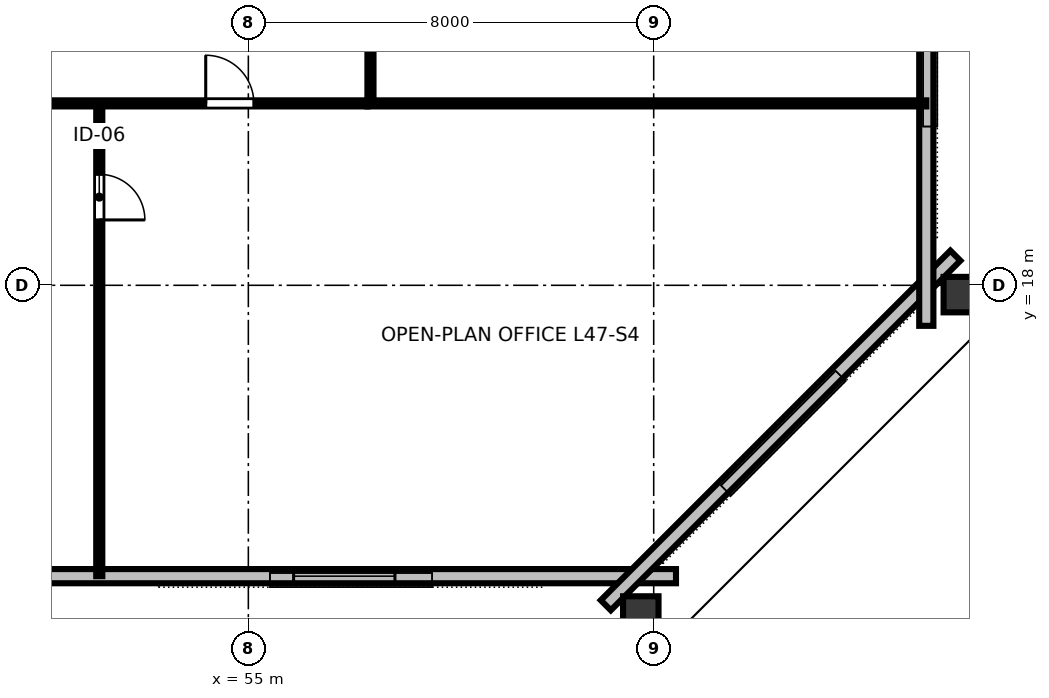
"""IFC4 building model, lengths in metres.
Left out: names, types, materials, properties, quantities, classifications, styles, units other than length and angle.
Written with IfcOpenShell. Run it as: python <this file> out.ifc"""

import sys

from ifc_helpers import new_model, si_unit, direction, frame, frame_2d, origin, origin_2d, place, context, subcontext, project, spatial, rectangle, hollow_rectangle, extrude, element, fill, save


model = new_model("IFC4")
c1 = context("Model", 3, precision=1e-05, world=origin(), true_north=direction((0.0, 1.0)))
c2 = subcontext(c1, "Body", "Model", "MODEL_VIEW")
j1 = project(units=[si_unit("LENGTHUNIT", "METRE"), si_unit("PLANEANGLEUNIT", "RADIAN")], contexts=[c1])
p1 = place(None, origin())
s1 = spatial("IfcSite", under=j1, at=p1, CompositionType="ELEMENT")
p2 = place(p1, origin())
s2 = spatial("IfcBuilding", under=s1, at=p2, CompositionType="ELEMENT")
p3 = place(p2, frame((0.0, 0.0, 180.6)))
s3 = spatial("IfcBuildingStorey", under=s2, at=p3, CompositionType="ELEMENT", Elevation=180.6)
for number, where, z_axis, x_axis in (
    (1, (62.745, 11.438, 0.0), (0.0, 0.0, 1.0), (1.0, 0.0, 0.0)),
    (2, (69.146, 17.816, 0.0), (0.0, 0.0, 1.0), (0.0, 1.0, 0.0)),
):
    element("IfcColumn", number, at=place(p3, frame(where, z_axis=z_axis, x_axis=x_axis)), inside=s3, PredefinedType="COLUMN", context=c2, shape_type="SweptSolid", body=[
        extrude(hollow_rectangle(XDim=0.7, YDim=0.85, WallThickness=0.04, at=origin_2d()), origin(), (0.0, 0.0, 1.0), 3.358),
    ])
p4 = place(p3, frame((28.56, 12.26, 0.0), z_axis=(0.0, 0.0, 1.0), x_axis=(1.0, 0.0, 0.0)))
e3 = element("IfcWall", 3, at=p4, inside=s3, PredefinedType="STANDARD", context=c2, shape_type="SweptSolid", body=[
    extrude(rectangle(XDim=34.88, YDim=0.28, at=frame_2d((17.44, 0.0))), origin(), (0.0, 0.0, 1.0), 3.36),
])
p5 = place(p4, frame((5.547, 0.0, 0.8)))
e4 = element("IfcOpeningElement", 4, at=p5, cuts=e3, PredefinedType="OPENING", context=c2, shape_type="SweptSolid", body=[
    extrude(rectangle(XDim=2.0, YDim=1.95, at=frame_2d((1.0, 0.975))), frame((0.0, 0.15, 0.0), z_axis=(0.0, -1.0, 0.0), x_axis=(1.0, 0.0, 0.0)), (0.0, 0.0, 1.0), 0.3),
])
p6 = place(p4, frame((9.178, 0.0, 0.8)))
e5 = element("IfcOpeningElement", 5, at=p6, cuts=e3, PredefinedType="OPENING", context=c2, shape_type="SweptSolid", body=[
    extrude(rectangle(XDim=2.0, YDim=1.95, at=frame_2d((1.0, 0.975))), frame((0.0, 0.15, 0.0), z_axis=(0.0, -1.0, 0.0), x_axis=(1.0, 0.0, 0.0)), (0.0, 0.0, 1.0), 0.3),
])
p7 = place(p4, frame((20.071, 0.0, 0.8)))
e6 = element("IfcOpeningElement", 6, at=p7, cuts=e3, PredefinedType="OPENING", context=c2, shape_type="SweptSolid", body=[
    extrude(rectangle(XDim=2.0, YDim=1.95, at=frame_2d((1.0, 0.975))), frame((0.0, 0.15, 0.0), z_axis=(0.0, -1.0, 0.0), x_axis=(1.0, 0.0, 0.0)), (0.0, 0.0, 1.0), 0.3),
])
p8 = place(p4, frame((27.333, 0.0, 0.8)))
e7 = element("IfcOpeningElement", 7, at=p8, cuts=e3, PredefinedType="OPENING", context=c2, shape_type="SweptSolid", body=[
    extrude(rectangle(XDim=2.0, YDim=1.95, at=frame_2d((1.0, 0.975))), frame((0.0, 0.15, 0.0), z_axis=(0.0, -1.0, 0.0), x_axis=(1.0, 0.0, 0.0)), (0.0, 0.0, 1.0), 0.3),
])
p9 = place(p3, frame((62.054, 11.686, 0.0), z_axis=(0.0, 0.0, 1.0), x_axis=(0.707106781187, 0.707106781187, 0.0)))
e8 = element("IfcWall", 8, at=p9, inside=s3, PredefinedType="STANDARD", context=c2, shape_type="SweptSolid", body=[
    extrude(rectangle(XDim=9.757, YDim=0.28, at=frame_2d((4.879, 0.0))), origin(), (0.0, 0.0, 1.0), 3.36),
])
p10 = place(p3, frame((68.38, 17.2, 0.0), z_axis=(0.0, 0.0, 1.0), x_axis=(0.0, 1.0, 0.0)))
e9 = element("IfcWall", 9, at=p10, inside=s3, PredefinedType="STANDARD", context=c2, shape_type="SweptSolid", body=[
    extrude(rectangle(XDim=29.6, YDim=0.28, at=frame_2d((14.8, 0.0))), origin(), (0.0, 0.0, 1.0), 3.36),
])
p11 = place(p10, frame((5.971, 0.0, 0.8)))
e10 = element("IfcOpeningElement", 10, at=p11, cuts=e9, PredefinedType="OPENING", context=c2, shape_type="SweptSolid", body=[
    extrude(rectangle(XDim=2.0, YDim=1.95, at=frame_2d((1.0, 0.975))), frame((0.0, 0.15, 0.0), z_axis=(0.0, -1.0, 0.0), x_axis=(1.0, 0.0, 0.0)), (0.0, 0.0, 1.0), 0.3),
])
p12 = place(p10, frame((9.886, 0.0, 0.8)))
e11 = element("IfcOpeningElement", 11, at=p12, cuts=e9, PredefinedType="OPENING", context=c2, shape_type="SweptSolid", body=[
    extrude(rectangle(XDim=2.0, YDim=1.95, at=frame_2d((1.0, 0.975))), frame((0.0, 0.15, 0.0), z_axis=(0.0, -1.0, 0.0), x_axis=(1.0, 0.0, 0.0)), (0.0, 0.0, 1.0), 0.3),
])
p13 = place(p10, frame((17.714, 0.0, 0.8)))
e12 = element("IfcOpeningElement", 12, at=p13, cuts=e9, PredefinedType="OPENING", context=c2, shape_type="SweptSolid", body=[
    extrude(rectangle(XDim=2.0, YDim=1.95, at=frame_2d((1.0, 0.975))), frame((0.0, 0.15, 0.0), z_axis=(0.0, -1.0, 0.0), x_axis=(1.0, 0.0, 0.0)), (0.0, 0.0, 1.0), 0.3),
])
p14 = place(p10, frame((21.629, 0.0, 0.8)))
e13 = element("IfcOpeningElement", 13, at=p14, cuts=e9, PredefinedType="OPENING", context=c2, shape_type="SweptSolid", body=[
    extrude(rectangle(XDim=2.0, YDim=1.95, at=frame_2d((1.0, 0.975))), frame((0.0, 0.15, 0.0), z_axis=(0.0, -1.0, 0.0), x_axis=(1.0, 0.0, 0.0)), (0.0, 0.0, 1.0), 0.3),
])
p15 = place(p3, frame((52.058, 21.59, 0.0), z_axis=(0.0, 0.0, 1.0), x_axis=(0.0, -1.0, 0.0)))
e14 = element("IfcWall", 14, at=p15, inside=s3, PredefinedType="PARTITIONING", context=c2, shape_type="SweptSolid", body=[
    extrude(rectangle(XDim=9.33, YDim=0.12, at=frame_2d((4.665, 0.0))), origin(), (0.0, 0.0, 1.0), 2.64),
])
p16 = place(p15, frame((1.4, 0.0, 0.0)))
e15 = element("IfcOpeningElement", 15, at=p16, cuts=e14, PredefinedType="OPENING", context=c2, shape_type="SweptSolid", body=[
    extrude(rectangle(XDim=0.9, YDim=2.15, at=frame_2d((0.45, 1.075))), frame((0.0, 0.07, 0.0), z_axis=(0.0, -1.0, 0.0), x_axis=(1.0, 0.0, 0.0)), (0.0, 0.0, 1.0), 0.14),
])
p17 = place(p3, frame((47.02, 21.59, 0.0), z_axis=(0.0, 0.0, 1.0), x_axis=(1.0, 0.0, 0.0)))
e16 = element("IfcWall", 16, at=p17, inside=s3, PredefinedType="PARTITIONING", context=c2, shape_type="SweptSolid", body=[
    extrude(rectangle(XDim=10.33, YDim=0.12, at=frame_2d((5.165, 0.0))), origin(), (0.0, 0.0, 1.0), 2.64),
])
p18 = place(p17, frame((2.044, 0.0, 0.0)))
e17 = element("IfcOpeningElement", 17, at=p18, cuts=e16, PredefinedType="OPENING", context=c2, shape_type="SweptSolid", body=[
    extrude(rectangle(XDim=0.95, YDim=2.15, at=frame_2d((0.475, 1.075))), frame((0.0, 0.07, 0.0), z_axis=(0.0, -1.0, 0.0), x_axis=(1.0, 0.0, 0.0)), (0.0, 0.0, 1.0), 0.14),
])
p19 = place(p17, frame((7.139, 0.0, 0.0)))
e18 = element("IfcOpeningElement", 18, at=p19, cuts=e16, PredefinedType="OPENING", context=c2, shape_type="SweptSolid", body=[
    extrude(rectangle(XDim=0.95, YDim=2.15, at=frame_2d((0.475, 1.075))), frame((0.0, 0.07, 0.0), z_axis=(0.0, -1.0, 0.0), x_axis=(1.0, 0.0, 0.0)), (0.0, 0.0, 1.0), 0.14),
])
p20 = place(p3, frame((57.41, 21.65, 0.0), z_axis=(0.0, 0.0, 1.0), x_axis=(0.0, 1.0, 0.0)))
e19 = element("IfcWall", 19, at=p20, inside=s3, PredefinedType="PARTITIONING", context=c2, shape_type="SweptSolid", body=[
    extrude(rectangle(XDim=20.7, YDim=0.12, at=frame_2d((10.35, 0.0))), origin(), (0.0, 0.0, 1.0), 2.64),
])
p21 = place(p20, frame((6.073, 0.0, 0.0)))
e20 = element("IfcOpeningElement", 20, at=p21, cuts=e19, PredefinedType="OPENING", context=c2, shape_type="SweptSolid", body=[
    extrude(rectangle(XDim=0.95, YDim=2.15, at=frame_2d((0.475, 1.075))), frame((0.0, 0.07, 0.0), z_axis=(0.0, -1.0, 0.0), x_axis=(1.0, 0.0, 0.0)), (0.0, 0.0, 1.0), 0.14),
])
p22 = place(p20, frame((16.223, 0.0, 0.0)))
e21 = element("IfcOpeningElement", 21, at=p22, cuts=e19, PredefinedType="OPENING", context=c2, shape_type="SweptSolid", body=[
    extrude(rectangle(XDim=0.95, YDim=2.15, at=frame_2d((0.475, 1.075))), frame((0.0, 0.07, 0.0), z_axis=(0.0, -1.0, 0.0), x_axis=(1.0, 0.0, 0.0)), (0.0, 0.0, 1.0), 0.14),
])
p23 = place(p3, frame((57.35, 21.59, 0.0), z_axis=(0.0, 0.0, 1.0), x_axis=(1.0, 0.0, 0.0)))
e22 = element("IfcWall", 22, at=p23, inside=s3, PredefinedType="PARTITIONING", context=c2, shape_type="SweptSolid", body=[
    extrude(rectangle(XDim=11.03, YDim=0.12, at=frame_2d((5.515, 0.0))), origin(), (0.0, 0.0, 1.0), 2.64),
])
p24 = place(p8, origin())
e23 = element("IfcWindow", 23, at=p24, inside=s3, PartitioningType="SINGLE_PANEL", PredefinedType="WINDOW", context=c2, shape_type="SweptSolid", body=[
    extrude(rectangle(XDim=2.0, YDim=1.95, at=frame_2d((1.0, 0.975))), frame((0.0, 0.03, 0.0), z_axis=(0.0, -1.0, 0.0), x_axis=(1.0, 0.0, 0.0)), (0.0, 0.0, 1.0), 0.06),
])
fill(e7, e23)
p25 = place(p16, origin())
e24 = element("IfcDoor", 24, at=p25, inside=s3, OperationType="SINGLE_SWING_RIGHT", PredefinedType="DOOR", context=c2, shape_type="SweptSolid", body=[
    extrude(rectangle(XDim=0.9, YDim=2.15, at=frame_2d((0.45, 1.075))), frame((0.0, 0.025, 0.0), z_axis=(0.0, -1.0, 0.0), x_axis=(1.0, 0.0, 0.0)), (0.0, 0.0, 1.0), 0.05),
])
fill(e15, e24)
p26 = place(p19, origin())
e25 = element("IfcDoor", 25, at=p26, inside=s3, OperationType="SINGLE_SWING_LEFT", PredefinedType="DOOR", context=c2, shape_type="SweptSolid", body=[
    extrude(rectangle(XDim=0.95, YDim=2.15, at=frame_2d((0.475, 1.075))), frame((0.0, 0.025, 0.0), z_axis=(0.0, -1.0, 0.0), x_axis=(1.0, 0.0, 0.0)), (0.0, 0.0, 1.0), 0.05),
])
fill(e18, e25)
save(model, sys.argv[1])
